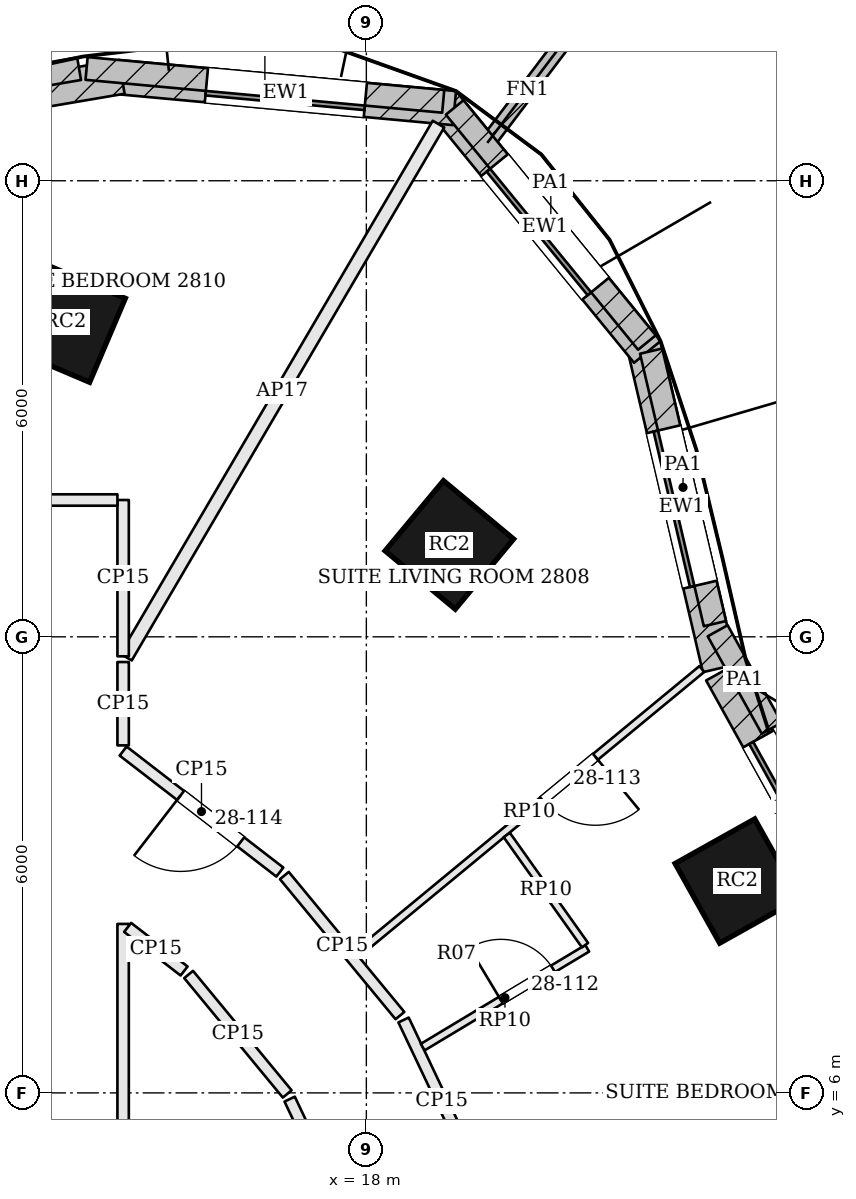
"""IFC4 building model, lengths in metres.
Left out: names, types, materials, properties, quantities, classifications, styles, units other than length and angle.
Written with IfcOpenShell. Run it as: python <this file> out.ifc"""

import sys

from ifc_helpers import new_model, si_unit, direction, frame, frame_2d, origin, origin_2d, place, context, subcontext, project, spatial, rectangle, extrude, element, fill, save


model = new_model("IFC4")
c1 = context("Model", 3, precision=1e-05, world=origin(), true_north=direction((0.0, 1.0)))
c2 = subcontext(c1, "Body", "Model", "MODEL_VIEW")
j1 = project(units=[si_unit("LENGTHUNIT", "METRE"), si_unit("PLANEANGLEUNIT", "RADIAN")], contexts=[c1])
p1 = place(None, origin())
s1 = spatial("IfcSite", under=j1, at=p1, CompositionType="ELEMENT")
p2 = place(p1, origin())
s2 = spatial("IfcBuilding", under=s1, at=p2, CompositionType="ELEMENT")
p3 = place(p2, frame((0.0, 0.0, 117.6)))
s3 = spatial("IfcBuildingStorey", under=s2, at=p3, CompositionType="ELEMENT", Elevation=117.6)
for number, where, z_axis, x_axis in (
    (1, (22.879, 8.787, 0.0), (0.0, 0.0, 1.0), (-0.489, 0.873, 0.0)),
    (2, (19.092, 13.209, 0.0), (0.0, 0.0, 1.0), (-0.769, 0.639, 0.0)),
    (3, (14.042, 16.136, 0.0), (0.0, 0.0, 1.0), (-0.92, 0.392, 0.0)),
):
    element("IfcColumn", number, at=place(p3, frame(where, z_axis=z_axis, x_axis=x_axis)), inside=s3, PredefinedType="COLUMN", context=c2, shape_type="SweptSolid", body=[
        extrude(rectangle(XDim=1.2, YDim=1.2, at=origin_2d()), origin(), (0.0, 0.0, 1.0), 2.8),
    ])
p4 = place(p3, frame((24.662, 7.939, 0.0), z_axis=(0.0, 0.0, 1.0), x_axis=(-0.485153910721, 0.874428775208, 0.0)))
e4 = element("IfcWall", 4, at=p4, inside=s3, PredefinedType="SOLIDWALL", context=c2, shape_type="SweptSolid", body=[
    extrude(rectangle(XDim=4.112, YDim=0.45, at=frame_2d((2.056, 0.0))), origin(), (0.0, 0.0, 1.0), 3.3),
])
p5 = place(p4, frame((1.006, 0.0, 0.9)))
e5 = element("IfcOpeningElement", 5, at=p5, cuts=e4, PredefinedType="OPENING", context=c2, shape_type="SweptSolid", body=[
    extrude(rectangle(XDim=2.1, YDim=1.8, at=frame_2d((1.05, 0.9))), frame((0.0, 0.235, 0.0), z_axis=(0.0, -1.0, 0.0), x_axis=(1.0, 0.0, 0.0)), (0.0, 0.0, 1.0), 0.47),
])
p6 = place(p3, frame((22.646, 11.586, 0.0), z_axis=(0.0, 0.0, 1.0), x_axis=(-0.227925124198, 0.973678662475, 0.0)))
e6 = element("IfcWall", 6, at=p6, inside=s3, PredefinedType="SOLIDWALL", context=c2, shape_type="SweptSolid", body=[
    extrude(rectangle(XDim=4.361, YDim=0.45, at=frame_2d((2.18, 0.0))), origin(), (0.0, 0.0, 1.0), 3.3),
])
p7 = place(p6, frame((1.13, 0.0, 0.9)))
e7 = element("IfcOpeningElement", 7, at=p7, cuts=e6, PredefinedType="OPENING", context=c2, shape_type="SweptSolid", body=[
    extrude(rectangle(XDim=2.1, YDim=1.8, at=frame_2d((1.05, 0.9))), frame((0.0, 0.235, 0.0), z_axis=(0.0, -1.0, 0.0), x_axis=(1.0, 0.0, 0.0)), (0.0, 0.0, 1.0), 0.47),
])
p8 = place(p3, frame((21.696, 15.748, 0.0), z_axis=(0.0, 0.0, 1.0), x_axis=(-0.632968710519, 0.774177377288, 0.0)))
e8 = element("IfcWall", 8, at=p8, inside=s3, PredefinedType="SOLIDWALL", context=c2, shape_type="SweptSolid", body=[
    extrude(rectangle(XDim=4.25, YDim=0.45, at=frame_2d((2.125, 0.0))), origin(), (0.0, 0.0, 1.0), 3.3),
])
p9 = place(p8, frame((1.075, 0.0, 0.9)))
e9 = element("IfcOpeningElement", 9, at=p9, cuts=e8, PredefinedType="OPENING", context=c2, shape_type="SweptSolid", body=[
    extrude(rectangle(XDim=2.1, YDim=1.8, at=frame_2d((1.05, 0.9))), frame((0.0, 0.235, 0.0), z_axis=(0.0, -1.0, 0.0), x_axis=(1.0, 0.0, 0.0)), (0.0, 0.0, 1.0), 0.47),
])
p10 = place(p3, frame((19.159, 18.956, 0.0), z_axis=(0.0, 0.0, 1.0), x_axis=(-0.995777399421, 0.091800712424, 0.0)))
e10 = element("IfcWall", 10, at=p10, inside=s3, PredefinedType="SOLIDWALL", context=c2, shape_type="SweptSolid", body=[
    extrude(rectangle(XDim=4.455, YDim=0.45, at=frame_2d((2.227, 0.0))), origin(), (0.0, 0.0, 1.0), 3.3),
])
p11 = place(p10, frame((1.177, 0.0, 0.9)))
e11 = element("IfcOpeningElement", 11, at=p11, cuts=e10, PredefinedType="OPENING", context=c2, shape_type="SweptSolid", body=[
    extrude(rectangle(XDim=2.1, YDim=1.8, at=frame_2d((1.05, 0.9))), frame((0.0, 0.235, 0.0), z_axis=(0.0, -1.0, 0.0), x_axis=(1.0, 0.0, 0.0)), (0.0, 0.0, 1.0), 0.47),
])
p12 = place(p3, frame((14.782, 19.367, 0.0), z_axis=(0.0, 0.0, 1.0), x_axis=(-0.98585584667, -0.167595493934, 0.0)))
e12 = element("IfcWall", 12, at=p12, inside=s3, PredefinedType="SOLIDWALL", context=c2, shape_type="SweptSolid", body=[
    extrude(rectangle(XDim=5.399, YDim=0.45, at=frame_2d((2.699, 0.0))), origin(), (0.0, 0.0, 1.0), 3.3),
])
p13 = place(p12, frame((1.649, 0.0, 0.9)))
e13 = element("IfcOpeningElement", 13, at=p13, cuts=e12, PredefinedType="OPENING", context=c2, shape_type="SweptSolid", body=[
    extrude(rectangle(XDim=2.1, YDim=1.8, at=frame_2d((1.05, 0.9))), frame((0.0, 0.235, 0.0), z_axis=(0.0, -1.0, 0.0), x_axis=(1.0, 0.0, 0.0)), (0.0, 0.0, 1.0), 0.47),
])
p14 = place(p3, frame((19.591, 18.498, 0.0), z_axis=(0.0, 0.0, 1.0), x_axis=(0.603387525063, 0.797448114048, 0.0)))
e14 = element("IfcWall", 14, at=p14, inside=s3, PredefinedType="SOLIDWALL", context=c2, shape_type="SweptSolid", body=[
    extrude(rectangle(XDim=1.75, YDim=0.2, at=frame_2d((0.875, 0.0))), origin(), (0.0, 0.0, 1.0), 3.3),
])
p15 = place(p3, frame((23.333, 10.798, 3.6), z_axis=(0.0, 0.0, 1.0), x_axis=(-0.4851761923, 0.874416412486, 0.0)))
e15 = element("IfcWall", 15, at=p15, inside=s3, PredefinedType="PARAPET", context=c2, shape_type="SweptSolid", body=[
    extrude(rectangle(XDim=1.466, YDim=0.3, at=frame_2d((0.733, 0.0))), origin(), (0.0, 0.0, 1.0), 1.1),
])
p16 = place(p3, frame((22.586, 12.174, 3.6), z_axis=(0.0, 0.0, 1.0), x_axis=(-0.227889817295, 0.973686926673, 0.0)))
e16 = element("IfcWall", 16, at=p16, inside=s3, PredefinedType="PARAPET", context=c2, shape_type="SweptSolid", body=[
    extrude(rectangle(XDim=3.682, YDim=0.3, at=frame_2d((1.841, 0.0))), origin(), (0.0, 0.0, 1.0), 1.1),
])
p17 = place(p3, frame((21.691, 15.872, 3.6), z_axis=(0.0, 0.0, 1.0), x_axis=(-0.632984818356, 0.774164207214, 0.0)))
e17 = element("IfcWall", 17, at=p17, inside=s3, PredefinedType="PARAPET", context=c2, shape_type="SweptSolid", body=[
    extrude(rectangle(XDim=3.995, YDim=0.3, at=frame_2d((1.997, 0.0))), origin(), (0.0, 0.0, 1.0), 1.1),
])
p18 = place(p3, frame((19.011, 19.045, 3.6), z_axis=(0.0, 0.0, 1.0), x_axis=(-0.995781185236, 0.091759637809, 0.0)))
e18 = element("IfcWall", 18, at=p18, inside=s3, PredefinedType="PARAPET", context=c2, shape_type="SweptSolid", body=[
    extrude(rectangle(XDim=4.712, YDim=0.3, at=frame_2d((2.356, 0.0))), origin(), (0.0, 0.0, 1.0), 1.1),
])
p19 = place(p3, frame((14.221, 19.473, 3.6), z_axis=(0.0, 0.0, 1.0), x_axis=(-0.985863279186, -0.167551767381, 0.0)))
e19 = element("IfcWall", 19, at=p19, inside=s3, PredefinedType="PARAPET", context=c2, shape_type="SweptSolid", body=[
    extrude(rectangle(XDim=3.365, YDim=0.3, at=frame_2d((1.682, 0.0))), origin(), (0.0, 0.0, 1.0), 1.1),
])
p20 = place(p3, frame((19.495, 4.836, 0.0), z_axis=(0.0, 0.0, 1.0), x_axis=(-0.428157819028, 0.903703979191, 0.0)))
e20 = element("IfcWall", 20, at=p20, inside=s3, PredefinedType="PARTITIONING", context=c2, shape_type="SweptSolid", body=[
    extrude(rectangle(XDim=2.349, YDim=0.15, at=frame_2d((1.175, 0.0))), origin(), (0.0, 0.0, 1.0), 2.684),
])
p21 = place(p3, frame((18.442, 7.017, 0.0), z_axis=(0.0, 0.0, 1.0), x_axis=(-0.636538018119, 0.7712453251, 0.0)))
e21 = element("IfcWall", 21, at=p21, inside=s3, PredefinedType="PARTITIONING", context=c2, shape_type="SweptSolid", body=[
    extrude(rectangle(XDim=2.389, YDim=0.15, at=frame_2d((1.194, 0.0))), origin(), (0.0, 0.0, 1.0), 2.684),
])
p22 = place(p3, frame((16.862, 8.905, 0.0), z_axis=(0.0, 0.0, 1.0), x_axis=(-0.791542595332, 0.611113999001, 0.0)))
e22 = element("IfcWall", 22, at=p22, inside=s3, PredefinedType="PARTITIONING", context=c2, shape_type="SweptSolid", body=[
    extrude(rectangle(XDim=2.605, YDim=0.15, at=frame_2d((1.302, 0.0))), origin(), (0.0, 0.0, 1.0), 2.684),
])
p23 = place(p22, frame((0.65, 0.0, 0.0)))
e23 = element("IfcOpeningElement", 23, at=p23, cuts=e22, PredefinedType="OPENING", context=c2, shape_type="SweptSolid", body=[
    extrude(rectangle(XDim=1.0, YDim=2.1, at=frame_2d((0.5, 1.05))), frame((0.0, 0.085, 0.0), z_axis=(0.0, -1.0, 0.0), x_axis=(1.0, 0.0, 0.0)), (0.0, 0.0, 1.0), 0.17),
])
p24 = place(p3, frame((14.8, 10.572, 0.0), z_axis=(0.0, 0.0, 1.0), x_axis=(0.0, 1.0, 0.0)))
e24 = element("IfcWall", 24, at=p24, inside=s3, PredefinedType="PARTITIONING", context=c2, shape_type="SweptSolid", body=[
    extrude(rectangle(XDim=1.097, YDim=0.15, at=frame_2d((0.548, 0.0))), origin(), (0.0, 0.0, 1.0), 2.684),
])
p25 = place(p3, frame((18.949, 18.745, 0.0), z_axis=(0.0, 0.0, 1.0), x_axis=(-0.505754187447, -0.862677634972, 0.0)))
e25 = element("IfcWall", 25, at=p25, inside=s3, PredefinedType="PARTITIONING", context=c2, shape_type="SweptSolid", body=[
    extrude(rectangle(XDim=8.128, YDim=0.175, at=frame_2d((4.064, 0.0))), origin(), (0.0, 0.0, 1.0), 2.684),
])
p26 = place(p3, frame((14.8, 11.744, 0.0), z_axis=(0.0, 0.0, 1.0), x_axis=(0.0, 1.0, 0.0)))
e26 = element("IfcWall", 26, at=p26, inside=s3, PredefinedType="PARTITIONING", context=c2, shape_type="SweptSolid", body=[
    extrude(rectangle(XDim=2.056, YDim=0.15, at=frame_2d((1.028, 0.0))), origin(), (0.0, 0.0, 1.0), 2.684),
])
p27 = place(p3, frame((14.725, 13.8, 0.0), z_axis=(0.0, 0.0, 1.0), x_axis=(-1.0, 0.0, 0.0)))
e27 = element("IfcWall", 27, at=p27, inside=s3, PredefinedType="PARTITIONING", context=c2, shape_type="SweptSolid", body=[
    extrude(rectangle(XDim=11.889, YDim=0.15, at=frame_2d((5.945, 0.0))), origin(), (0.0, 0.0, 1.0), 2.684),
])
p28 = place(p27, frame((10.041, 0.0, 0.0)))
e28 = element("IfcOpeningElement", 28, at=p28, cuts=e27, PredefinedType="OPENING", context=c2, shape_type="SweptSolid", body=[
    extrude(rectangle(XDim=1.0, YDim=2.1, at=frame_2d((0.5, 1.05))), frame((0.0, 0.085, 0.0), z_axis=(0.0, -1.0, 0.0), x_axis=(1.0, 0.0, 0.0)), (0.0, 0.0, 1.0), 0.17),
])
p29 = place(p3, frame((15.662, 7.558, 0.0), z_axis=(0.0, 0.0, 1.0), x_axis=(0.636500564941, -0.7712762351, 0.0)))
e29 = element("IfcWall", 29, at=p29, inside=s3, PredefinedType="PARTITIONING", context=c2, shape_type="SweptSolid", body=[
    extrude(rectangle(XDim=2.038, YDim=0.15, at=frame_2d((1.019, 0.0))), origin(), (0.0, 0.0, 1.0), 2.684),
])
p30 = place(p3, frame((16.991, 5.918, 0.0), z_axis=(0.0, 0.0, 1.0), x_axis=(0.428199863362, -0.903684058185, 0.0)))
e30 = element("IfcWall", 30, at=p30, inside=s3, PredefinedType="PARTITIONING", context=c2, shape_type="SweptSolid", body=[
    extrude(rectangle(XDim=1.941, YDim=0.15, at=frame_2d((0.971, 0.0))), origin(), (0.0, 0.0, 1.0), 2.684),
])
p31 = place(p3, frame((14.8, -4.725, 0.0), z_axis=(0.0, 0.0, 1.0), x_axis=(0.0, 1.0, 0.0)))
e31 = element("IfcWall", 31, at=p31, inside=s3, PredefinedType="PARTITIONING", context=c2, shape_type="SweptSolid", body=[
    extrude(rectangle(XDim=12.948, YDim=0.15, at=frame_2d((6.474, 0.0))), origin(), (0.0, 0.0, 1.0), 2.684),
])
p32 = place(p31, frame((5.536, 0.0, 0.0)))
e32 = element("IfcOpeningElement", 32, at=p32, cuts=e31, PredefinedType="OPENING", context=c2, shape_type="SweptSolid", body=[
    extrude(rectangle(XDim=1.8, YDim=2.1, at=frame_2d((0.9, 1.05))), frame((0.0, 0.085, 0.0), z_axis=(0.0, -1.0, 0.0), x_axis=(1.0, 0.0, 0.0)), (0.0, 0.0, 1.0), 0.17),
])
p33 = place(p3, frame((14.859, 8.177, 0.0), z_axis=(0.0, 0.0, 1.0), x_axis=(0.791588113465, -0.611055037309, 0.0)))
e33 = element("IfcWall", 33, at=p33, inside=s3, PredefinedType="PARTITIONING", context=c2, shape_type="SweptSolid", body=[
    extrude(rectangle(XDim=0.938, YDim=0.15, at=frame_2d((0.469, 0.0))), origin(), (0.0, 0.0, 1.0), 2.684),
])
p34 = place(p3, frame((22.414, 11.576, 0.0), z_axis=(0.0, 0.0, 1.0), x_axis=(-0.77113161257, -0.636675769992, 0.0)))
e34 = element("IfcWall", 34, at=p34, inside=s3, PredefinedType="PARTITIONING", context=c2, shape_type="SweptSolid", body=[
    extrude(rectangle(XDim=5.89, YDim=0.1, at=frame_2d((2.945, 0.0))), origin(), (0.0, 0.0, 1.0), 2.684),
])
p35 = place(p34, frame((1.815, 0.0, 0.0)))
e35 = element("IfcOpeningElement", 35, at=p35, cuts=e34, PredefinedType="OPENING", context=c2, shape_type="SweptSolid", body=[
    extrude(rectangle(XDim=0.9, YDim=2.4, at=frame_2d((0.45, 1.2))), frame((0.0, 0.06, 0.0), z_axis=(0.0, -1.0, 0.0), x_axis=(1.0, 0.0, 0.0)), (0.0, 0.0, 1.0), 0.12),
])
p36 = place(p3, frame((18.741, 6.602, 0.0), z_axis=(0.0, 0.0, 1.0), x_axis=(0.857151480402, 0.515064403395, 0.0)))
e36 = element("IfcWall", 36, at=p36, inside=s3, PredefinedType="PARTITIONING", context=c2, shape_type="SweptSolid", body=[
    extrude(rectangle(XDim=2.525, YDim=0.1, at=frame_2d((1.262, 0.0))), origin(), (0.0, 0.0, 1.0), 2.684),
])
p37 = place(p36, frame((1.2, 0.0, 0.0)))
e37 = element("IfcOpeningElement", 37, at=p37, cuts=e36, PredefinedType="OPENING", context=c2, shape_type="SweptSolid", body=[
    extrude(rectangle(XDim=0.8, YDim=2.1, at=frame_2d((0.4, 1.05))), frame((0.0, 0.06, 0.0), z_axis=(0.0, -1.0, 0.0), x_axis=(1.0, 0.0, 0.0)), (0.0, 0.0, 1.0), 0.12),
])
p38 = place(p3, frame((20.877, 7.943, 0.0), z_axis=(0.0, 0.0, 1.0), x_axis=(-0.578923744967, 0.815381688238, 0.0)))
e38 = element("IfcWall", 38, at=p38, inside=s3, PredefinedType="PARTITIONING", context=c2, shape_type="SweptSolid", body=[
    extrude(rectangle(XDim=1.778, YDim=0.1, at=frame_2d((0.889, 0.0))), origin(), (0.0, 0.0, 1.0), 2.684),
])
p39 = place(p5, origin())
e39 = element("IfcWindow", 39, at=p39, inside=s3, PartitioningType="SINGLE_PANEL", PredefinedType="WINDOW", context=c2, shape_type="SweptSolid", body=[
    extrude(rectangle(XDim=2.1, YDim=1.8, at=frame_2d((1.05, 0.9))), frame((0.0, 0.135, 0.0), z_axis=(0.0, -1.0, 0.0), x_axis=(1.0, 0.0, 0.0)), (0.0, 0.0, 1.0), 0.06),
])
fill(e5, e39)
p40 = place(p7, origin())
e40 = element("IfcWindow", 40, at=p40, inside=s3, PartitioningType="SINGLE_PANEL", PredefinedType="WINDOW", context=c2, shape_type="SweptSolid", body=[
    extrude(rectangle(XDim=2.1, YDim=1.8, at=frame_2d((1.05, 0.9))), frame((0.0, 0.135, 0.0), z_axis=(0.0, -1.0, 0.0), x_axis=(1.0, 0.0, 0.0)), (0.0, 0.0, 1.0), 0.06),
])
fill(e7, e40)
p41 = place(p9, origin())
e41 = element("IfcWindow", 41, at=p41, inside=s3, PartitioningType="SINGLE_PANEL", PredefinedType="WINDOW", context=c2, shape_type="SweptSolid", body=[
    extrude(rectangle(XDim=2.1, YDim=1.8, at=frame_2d((1.05, 0.9))), frame((0.0, 0.135, 0.0), z_axis=(0.0, -1.0, 0.0), x_axis=(1.0, 0.0, 0.0)), (0.0, 0.0, 1.0), 0.06),
])
fill(e9, e41)
p42 = place(p11, origin())
e42 = element("IfcWindow", 42, at=p42, inside=s3, PartitioningType="SINGLE_PANEL", PredefinedType="WINDOW", context=c2, shape_type="SweptSolid", body=[
    extrude(rectangle(XDim=2.1, YDim=1.8, at=frame_2d((1.05, 0.9))), frame((0.0, 0.135, 0.0), z_axis=(0.0, -1.0, 0.0), x_axis=(1.0, 0.0, 0.0)), (0.0, 0.0, 1.0), 0.06),
])
fill(e11, e42)
p43 = place(p37, origin())
e43 = element("IfcDoor", 43, at=p43, inside=s3, OperationType="SINGLE_SWING_LEFT", PredefinedType="DOOR", context=c2, shape_type="SweptSolid", body=[
    extrude(rectangle(XDim=0.8, YDim=2.1, at=frame_2d((0.4, 1.05))), frame((0.0, 0.025, 0.0), z_axis=(0.0, -1.0, 0.0), x_axis=(1.0, 0.0, 0.0)), (0.0, 0.0, 1.0), 0.05),
])
fill(e37, e43)
p44 = place(p35, origin())
e44 = element("IfcDoor", 44, at=p44, inside=s3, OperationType="SINGLE_SWING_LEFT", PredefinedType="DOOR", context=c2, shape_type="SweptSolid", body=[
    extrude(rectangle(XDim=0.9, YDim=2.4, at=frame_2d((0.45, 1.2))), frame((0.0, 0.025, 0.0), z_axis=(0.0, -1.0, 0.0), x_axis=(1.0, 0.0, 0.0)), (0.0, 0.0, 1.0), 0.05),
])
fill(e35, e44)
p45 = place(p23, origin())
e45 = element("IfcDoor", 45, at=p45, inside=s3, OperationType="SINGLE_SWING_RIGHT", PredefinedType="DOOR", context=c2, shape_type="SweptSolid", body=[
    extrude(rectangle(XDim=1.0, YDim=2.1, at=frame_2d((0.5, 1.05))), frame((0.0, 0.025, 0.0), z_axis=(0.0, -1.0, 0.0), x_axis=(1.0, 0.0, 0.0)), (0.0, 0.0, 1.0), 0.05),
])
fill(e23, e45)
save(model, sys.argv[1])
